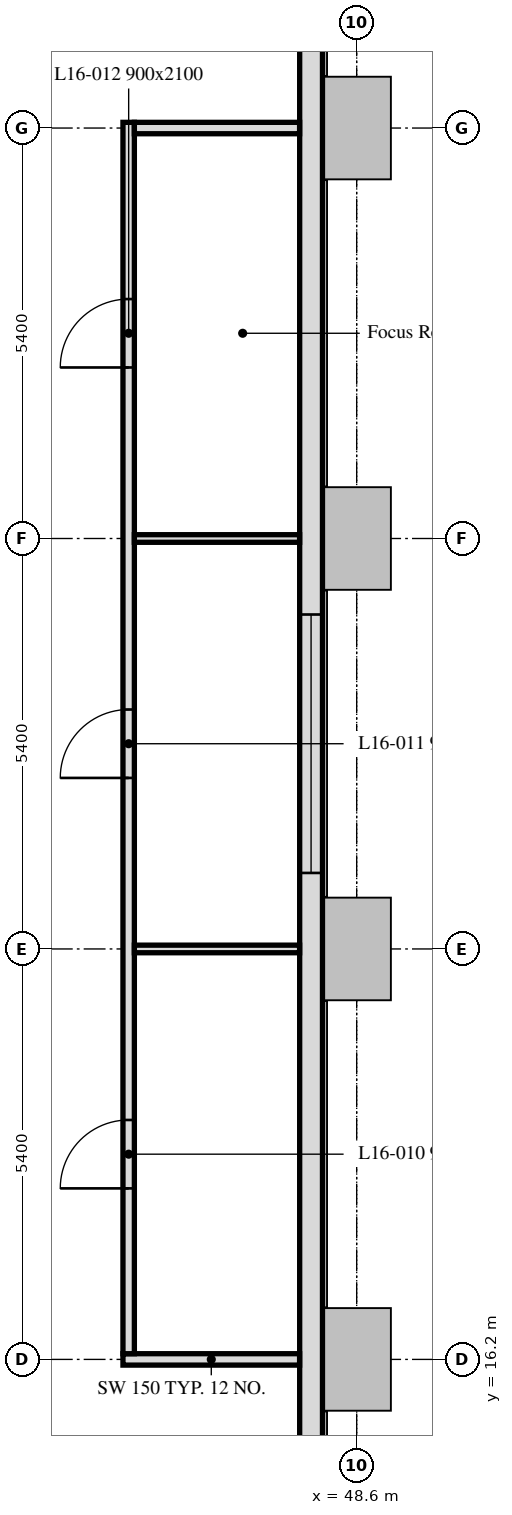
"""IFC4 building model, lengths in metres.
Left out: names, types, materials, properties, quantities, classifications, styles, units other than length and angle.
Written with IfcOpenShell. Run it as: python <this file> out.ifc"""

import sys

from ifc_helpers import new_model, si_unit, direction, frame, frame_2d, origin, place, context, subcontext, project, spatial, rectangle, extrude, element, fill, save


model = new_model("IFC4")
c1 = context("Model", 3, precision=1e-05, world=origin(), true_north=direction((0.0, 1.0)))
c2 = subcontext(c1, "Body", "Model", "MODEL_VIEW")
j1 = project(units=[si_unit("LENGTHUNIT", "METRE"), si_unit("PLANEANGLEUNIT", "RADIAN")], contexts=[c1])
p1 = place(None, origin())
s1 = spatial("IfcSite", under=j1, at=p1, CompositionType="ELEMENT")
p2 = place(p1, origin())
s2 = spatial("IfcBuilding", under=s1, at=p2, CompositionType="ELEMENT")
p3 = place(p2, frame((0.0, 0.0, 72.6)))
s3 = spatial("IfcBuildingStorey", under=s2, at=p3, CompositionType="ELEMENT", Elevation=72.6)
p4 = place(p3, frame((48.0, 10.986, 0.0), z_axis=(0.0, 0.0, 1.0), x_axis=(0.0, 1.0, 0.0)))
e1 = element("IfcWall", 1, at=p4, inside=s3, PredefinedType="SOLIDWALL", context=c2, shape_type="SweptSolid", body=[
    extrude(rectangle(XDim=32.027, YDim=0.3, at=frame_2d((16.014, 0.0))), origin(), (0.0, 0.0, 1.0), 3.5),
])
p5 = place(p4, frame((1.164, 0.0, 0.9)))
e2 = element("IfcOpeningElement", 2, at=p5, cuts=e1, PredefinedType="OPENING", context=c2, shape_type="SweptSolid", body=[
    extrude(rectangle(XDim=1.1, YDim=1.7, at=frame_2d((0.55, 0.85))), frame((0.0, 0.16, 0.0), z_axis=(0.0, -1.0, 0.0), x_axis=(1.0, 0.0, 0.0)), (0.0, 0.0, 1.0), 0.32),
])
p6 = place(p4, frame((2.764, 0.0, 0.9)))
e3 = element("IfcOpeningElement", 3, at=p6, cuts=e1, PredefinedType="OPENING", context=c2, shape_type="SweptSolid", body=[
    extrude(rectangle(XDim=1.1, YDim=1.7, at=frame_2d((0.55, 0.85))), frame((0.0, 0.16, 0.0), z_axis=(0.0, -1.0, 0.0), x_axis=(1.0, 0.0, 0.0)), (0.0, 0.0, 1.0), 0.32),
])
p7 = place(p4, frame((11.614, 0.0, 0.9)))
e4 = element("IfcOpeningElement", 4, at=p7, cuts=e1, PredefinedType="OPENING", context=c2, shape_type="SweptSolid", body=[
    extrude(rectangle(XDim=3.4, YDim=1.7, at=frame_2d((1.7, 0.85))), frame((0.0, 0.16, 0.0), z_axis=(0.0, -1.0, 0.0), x_axis=(1.0, 0.0, 0.0)), (0.0, 0.0, 1.0), 0.32),
])
p8 = place(p4, frame((22.764, 0.0, 0.9)))
e5 = element("IfcOpeningElement", 5, at=p8, cuts=e1, PredefinedType="OPENING", context=c2, shape_type="SweptSolid", body=[
    extrude(rectangle(XDim=1.1, YDim=1.7, at=frame_2d((0.55, 0.85))), frame((0.0, 0.16, 0.0), z_axis=(0.0, -1.0, 0.0), x_axis=(1.0, 0.0, 0.0)), (0.0, 0.0, 1.0), 0.32),
])
p9 = place(p4, frame((24.364, 0.0, 0.9)))
e6 = element("IfcOpeningElement", 6, at=p9, cuts=e1, PredefinedType="OPENING", context=c2, shape_type="SweptSolid", body=[
    extrude(rectangle(XDim=1.1, YDim=1.7, at=frame_2d((0.55, 0.85))), frame((0.0, 0.16, 0.0), z_axis=(0.0, -1.0, 0.0), x_axis=(1.0, 0.0, 0.0)), (0.0, 0.0, 1.0), 0.32),
])
p10 = place(p3, frame((47.849, 16.2, 0.0), z_axis=(0.0, 0.0, 1.0), x_axis=(-1.0, 0.0, 0.0)))
e7 = element("IfcWall", 7, at=p10, inside=s3, PredefinedType="PARTITIONING", context=c2, shape_type="SweptSolid", body=[
    extrude(rectangle(XDim=2.324, YDim=0.15, at=frame_2d((1.162, 0.0))), origin(), (0.0, 0.0, 1.0), 2.75),
])
p11 = place(p3, frame((45.6, 16.275, 0.0), z_axis=(0.0, 0.0, 1.0), x_axis=(0.0, 1.0, 0.0)))
e8 = element("IfcWall", 8, at=p11, inside=s3, PredefinedType="PARTITIONING", context=c2, shape_type="SweptSolid", body=[
    extrude(rectangle(XDim=16.2, YDim=0.15, at=frame_2d((8.1, 0.0))), origin(), (0.0, 0.0, 1.0), 2.75),
])
p12 = place(p11, frame((2.175, 0.0, 0.0)))
e9 = element("IfcOpeningElement", 9, at=p12, cuts=e8, PredefinedType="OPENING", context=c2, shape_type="SweptSolid", body=[
    extrude(rectangle(XDim=0.9, YDim=2.1, at=frame_2d((0.45, 1.05))), frame((0.0, 0.075, 0.0), z_axis=(0.0, -1.0, 0.0), x_axis=(1.0, 0.0, 0.0)), (0.0, 0.0, 1.0), 0.15),
])
p13 = place(p11, frame((7.575, 0.0, 0.0)))
e10 = element("IfcOpeningElement", 10, at=p13, cuts=e8, PredefinedType="OPENING", context=c2, shape_type="SweptSolid", body=[
    extrude(rectangle(XDim=0.9, YDim=2.1, at=frame_2d((0.45, 1.05))), frame((0.0, 0.075, 0.0), z_axis=(0.0, -1.0, 0.0), x_axis=(1.0, 0.0, 0.0)), (0.0, 0.0, 1.0), 0.15),
])
p14 = place(p11, frame((12.975, 0.0, 0.0)))
e11 = element("IfcOpeningElement", 11, at=p14, cuts=e8, PredefinedType="OPENING", context=c2, shape_type="SweptSolid", body=[
    extrude(rectangle(XDim=0.9, YDim=2.1, at=frame_2d((0.45, 1.05))), frame((0.0, 0.075, 0.0), z_axis=(0.0, -1.0, 0.0), x_axis=(1.0, 0.0, 0.0)), (0.0, 0.0, 1.0), 0.15),
])
p15 = place(p3, frame((45.675, 32.4, 0.0), z_axis=(0.0, 0.0, 1.0), x_axis=(1.0, 0.0, 0.0)))
e12 = element("IfcWall", 12, at=p15, inside=s3, PredefinedType="PARTITIONING", context=c2, shape_type="SweptSolid", body=[
    extrude(rectangle(XDim=2.174, YDim=0.15, at=frame_2d((1.087, 0.0))), origin(), (0.0, 0.0, 1.0), 2.75),
])
for number, where, z_axis, x_axis in (
    (13, (47.849, 21.6, 0.0), (0.0, 0.0, 1.0), (-1.0, 0.0, 0.0)),
    (14, (47.849, 27.0, 0.0), (0.0, 0.0, 1.0), (-1.0, 0.0, 0.0)),
):
    element("IfcWall", number, at=place(p3, frame(where, z_axis=z_axis, x_axis=x_axis)), inside=s3, PredefinedType="PARTITIONING", context=c2, shape_type="SweptSolid", body=[
        extrude(rectangle(XDim=2.174, YDim=0.1, at=frame_2d((1.087, 0.0))), origin(), (0.0, 0.0, 1.0), 2.75),
    ])
p16 = place(p7, origin())
e15 = element("IfcWindow", 15, at=p16, inside=s3, PartitioningType="SINGLE_PANEL", PredefinedType="WINDOW", context=c2, shape_type="SweptSolid", body=[
    extrude(rectangle(XDim=3.4, YDim=1.7, at=frame_2d((1.7, 0.85))), frame((0.0, 0.03, 0.0), z_axis=(0.0, -1.0, 0.0), x_axis=(1.0, 0.0, 0.0)), (0.0, 0.0, 1.0), 0.06),
])
fill(e4, e15)
p17 = place(p12, origin())
e16 = element("IfcDoor", 16, at=p17, inside=s3, OperationType="SINGLE_SWING_RIGHT", PredefinedType="DOOR", context=c2, shape_type="SweptSolid", body=[
    extrude(rectangle(XDim=0.9, YDim=2.1, at=frame_2d((0.45, 1.05))), frame((0.0, 0.025, 0.0), z_axis=(0.0, -1.0, 0.0), x_axis=(1.0, 0.0, 0.0)), (0.0, 0.0, 1.0), 0.05),
])
fill(e9, e16)
p18 = place(p13, origin())
e17 = element("IfcDoor", 17, at=p18, inside=s3, OperationType="SINGLE_SWING_RIGHT", PredefinedType="DOOR", context=c2, shape_type="SweptSolid", body=[
    extrude(rectangle(XDim=0.9, YDim=2.1, at=frame_2d((0.45, 1.05))), frame((0.0, 0.025, 0.0), z_axis=(0.0, -1.0, 0.0), x_axis=(1.0, 0.0, 0.0)), (0.0, 0.0, 1.0), 0.05),
])
fill(e10, e17)
p19 = place(p14, origin())
e18 = element("IfcDoor", 18, at=p19, inside=s3, OperationType="SINGLE_SWING_RIGHT", PredefinedType="DOOR", context=c2, shape_type="SweptSolid", body=[
    extrude(rectangle(XDim=0.9, YDim=2.1, at=frame_2d((0.45, 1.05))), frame((0.0, 0.025, 0.0), z_axis=(0.0, -1.0, 0.0), x_axis=(1.0, 0.0, 0.0)), (0.0, 0.0, 1.0), 0.05),
])
fill(e11, e18)
save(model, sys.argv[1])
